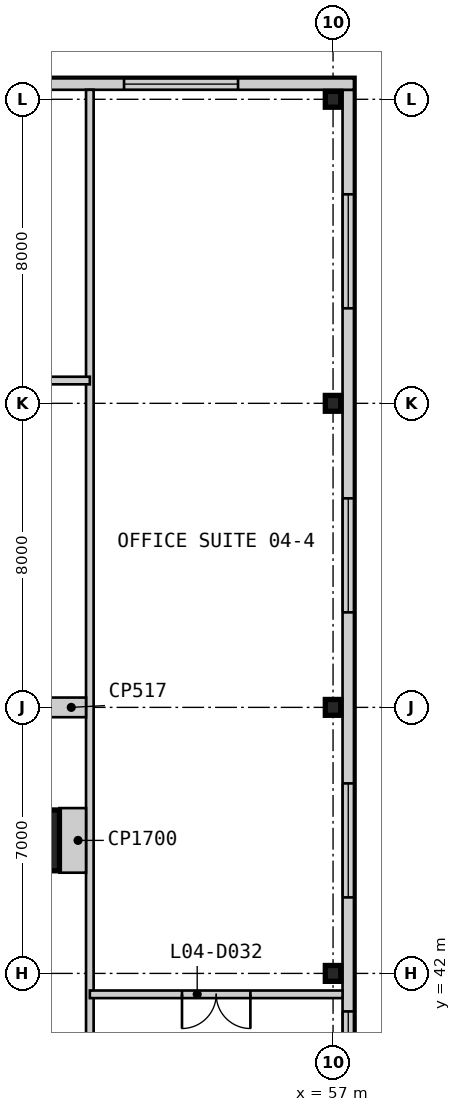
"""IFC4 building model, lengths in metres.
Left out: names, types, materials, properties, quantities, classifications, styles, units other than length and angle.
Written with IfcOpenShell. Run it as: python <this file> out.ifc"""

import sys

from ifc_helpers import new_model, si_unit, direction, frame, frame_2d, origin, origin_2d, place, context, subcontext, project, spatial, rectangle, i_section, extrude, element, fill, save


model = new_model("IFC4")
c1 = context("Model", 3, precision=1e-05, world=origin(), true_north=direction((0.0, 1.0)))
c2 = subcontext(c1, "Body", "Model", "MODEL_VIEW")
j1 = project(units=[si_unit("LENGTHUNIT", "METRE"), si_unit("PLANEANGLEUNIT", "RADIAN")], contexts=[c1])
p1 = place(None, origin())
s1 = spatial("IfcSite", under=j1, at=p1, CompositionType="ELEMENT")
p2 = place(p1, origin())
s2 = spatial("IfcBuilding", under=s1, at=p2, CompositionType="ELEMENT")
p3 = place(p2, frame((0.0, 0.0, 21.4)))
s3 = spatial("IfcBuildingStorey", under=s2, at=p3, CompositionType="ELEMENT", Elevation=21.4)
p4 = place(p3, frame((49.0, 45.5, 0.0), z_axis=(0.0, 0.0, 1.0), x_axis=(1.0, 0.0, 0.0)))
e1 = element("IfcColumn", 1, at=p4, inside=s3, PredefinedType="COLUMN", context=c2, shape_type="SweptSolid", body=[
    extrude(rectangle(XDim=1.6, YDim=1.6, at=origin_2d()), origin(), (0.0, 0.0, 1.0), 4.8),
])
for number, where, z_axis, x_axis in (
    (2, (57.0, 42.0, 0.0), (0.0, 0.0, 1.0), (1.0, 0.0, 0.0)),
    (3, (57.0, 49.0, 0.0), (0.0, 0.0, 1.0), (1.0, 0.0, 0.0)),
    (4, (57.0, 57.0, 0.0), (0.0, 0.0, 1.0), (1.0, 0.0, 0.0)),
    (5, (57.0, 65.0, 0.0), (0.0, 0.0, 1.0), (1.0, 0.0, 0.0)),
):
    element("IfcColumn", number, at=place(p3, frame(where, z_axis=z_axis, x_axis=x_axis)), inside=s3, PredefinedType="COLUMN", context=c2, shape_type="SweptSolid", body=[
        extrude(i_section(OverallWidth=0.406, OverallDepth=0.417, WebThickness=0.03, FlangeThickness=0.048, at=origin_2d()), origin(), (0.0, 0.0, 1.0), 4.8),
    ])
p5 = place(p3, frame((57.4, -7.25, 0.0), z_axis=(0.0, 0.0, 1.0), x_axis=(0.0, 1.0, 0.0)))
e6 = element("IfcWall", 6, at=p5, inside=s3, PredefinedType="SOLIDWALL", context=c2, shape_type="SweptSolid", body=[
    extrude(rectangle(XDim=72.5, YDim=0.3, at=frame_2d((36.25, 0.0))), origin(), (0.0, 0.0, 1.0), 4.5),
])
p6 = place(p5, frame((2.75, 0.0, 0.9)))
e7 = element("IfcOpeningElement", 7, at=p6, cuts=e6, PredefinedType="OPENING", context=c2, shape_type="SweptSolid", body=[
    extrude(rectangle(XDim=3.0, YDim=2.4, at=frame_2d((1.5, 1.2))), frame((0.0, 0.16, 0.0), z_axis=(0.0, -1.0, 0.0), x_axis=(1.0, 0.0, 0.0)), (0.0, 0.0, 1.0), 0.32),
])
p7 = place(p5, frame((10.75, 0.0, 0.9)))
e8 = element("IfcOpeningElement", 8, at=p7, cuts=e6, PredefinedType="OPENING", context=c2, shape_type="SweptSolid", body=[
    extrude(rectangle(XDim=3.0, YDim=2.4, at=frame_2d((1.5, 1.2))), frame((0.0, 0.16, 0.0), z_axis=(0.0, -1.0, 0.0), x_axis=(1.0, 0.0, 0.0)), (0.0, 0.0, 1.0), 0.32),
])
p8 = place(p5, frame((24.75, 0.0, 0.9)))
e9 = element("IfcOpeningElement", 9, at=p8, cuts=e6, PredefinedType="OPENING", context=c2, shape_type="SweptSolid", body=[
    extrude(rectangle(XDim=3.0, YDim=2.4, at=frame_2d((1.5, 1.2))), frame((0.0, 0.16, 0.0), z_axis=(0.0, -1.0, 0.0), x_axis=(1.0, 0.0, 0.0)), (0.0, 0.0, 1.0), 0.32),
])
p9 = place(p5, frame((36.75, 0.0, 0.9)))
e10 = element("IfcOpeningElement", 10, at=p9, cuts=e6, PredefinedType="OPENING", context=c2, shape_type="SweptSolid", body=[
    extrude(rectangle(XDim=3.0, YDim=2.4, at=frame_2d((1.5, 1.2))), frame((0.0, 0.16, 0.0), z_axis=(0.0, -1.0, 0.0), x_axis=(1.0, 0.0, 0.0)), (0.0, 0.0, 1.0), 0.32),
])
p10 = place(p5, frame((45.25, 0.0, 0.9)))
e11 = element("IfcOpeningElement", 11, at=p10, cuts=e6, PredefinedType="OPENING", context=c2, shape_type="SweptSolid", body=[
    extrude(rectangle(XDim=3.0, YDim=2.4, at=frame_2d((1.5, 1.2))), frame((0.0, 0.16, 0.0), z_axis=(0.0, -1.0, 0.0), x_axis=(1.0, 0.0, 0.0)), (0.0, 0.0, 1.0), 0.32),
])
p11 = place(p5, frame((51.25, 0.0, 0.9)))
e12 = element("IfcOpeningElement", 12, at=p11, cuts=e6, PredefinedType="OPENING", context=c2, shape_type="SweptSolid", body=[
    extrude(rectangle(XDim=3.0, YDim=2.4, at=frame_2d((1.5, 1.2))), frame((0.0, 0.16, 0.0), z_axis=(0.0, -1.0, 0.0), x_axis=(1.0, 0.0, 0.0)), (0.0, 0.0, 1.0), 0.32),
])
p12 = place(p5, frame((58.75, 0.0, 0.9)))
e13 = element("IfcOpeningElement", 13, at=p12, cuts=e6, PredefinedType="OPENING", context=c2, shape_type="SweptSolid", body=[
    extrude(rectangle(XDim=3.0, YDim=2.4, at=frame_2d((1.5, 1.2))), frame((0.0, 0.16, 0.0), z_axis=(0.0, -1.0, 0.0), x_axis=(1.0, 0.0, 0.0)), (0.0, 0.0, 1.0), 0.32),
])
p13 = place(p5, frame((66.75, 0.0, 0.9)))
e14 = element("IfcOpeningElement", 14, at=p13, cuts=e6, PredefinedType="OPENING", context=c2, shape_type="SweptSolid", body=[
    extrude(rectangle(XDim=3.0, YDim=2.4, at=frame_2d((1.5, 1.2))), frame((0.0, 0.16, 0.0), z_axis=(0.0, -1.0, 0.0), x_axis=(1.0, 0.0, 0.0)), (0.0, 0.0, 1.0), 0.32),
])
p14 = place(p3, frame((57.55, 65.4, 0.0), z_axis=(0.0, 0.0, 1.0), x_axis=(-1.0, 0.0, 0.0)))
e15 = element("IfcWall", 15, at=p14, inside=s3, PredefinedType="SOLIDWALL", context=c2, shape_type="SweptSolid", body=[
    extrude(rectangle(XDim=65.1, YDim=0.3, at=frame_2d((32.55, 0.0))), origin(), (0.0, 0.0, 1.0), 4.5),
])
p15 = place(p14, frame((59.05, 0.0, 0.9)))
e16 = element("IfcOpeningElement", 16, at=p15, cuts=e15, PredefinedType="OPENING", context=c2, shape_type="SweptSolid", body=[
    extrude(rectangle(XDim=3.0, YDim=2.4, at=frame_2d((1.5, 1.2))), frame((0.0, 0.16, 0.0), z_axis=(0.0, -1.0, 0.0), x_axis=(1.0, 0.0, 0.0)), (0.0, 0.0, 1.0), 0.32),
])
p16 = place(p14, frame((51.05, 0.0, 0.9)))
e17 = element("IfcOpeningElement", 17, at=p16, cuts=e15, PredefinedType="OPENING", context=c2, shape_type="SweptSolid", body=[
    extrude(rectangle(XDim=3.0, YDim=2.4, at=frame_2d((1.5, 1.2))), frame((0.0, 0.16, 0.0), z_axis=(0.0, -1.0, 0.0), x_axis=(1.0, 0.0, 0.0)), (0.0, 0.0, 1.0), 0.32),
])
p17 = place(p14, frame((37.05, 0.0, 0.9)))
e18 = element("IfcOpeningElement", 18, at=p17, cuts=e15, PredefinedType="OPENING", context=c2, shape_type="SweptSolid", body=[
    extrude(rectangle(XDim=3.0, YDim=2.4, at=frame_2d((1.5, 1.2))), frame((0.0, 0.16, 0.0), z_axis=(0.0, -1.0, 0.0), x_axis=(1.0, 0.0, 0.0)), (0.0, 0.0, 1.0), 0.32),
])
p18 = place(p14, frame((25.05, 0.0, 0.9)))
e19 = element("IfcOpeningElement", 19, at=p18, cuts=e15, PredefinedType="OPENING", context=c2, shape_type="SweptSolid", body=[
    extrude(rectangle(XDim=3.0, YDim=2.4, at=frame_2d((1.5, 1.2))), frame((0.0, 0.16, 0.0), z_axis=(0.0, -1.0, 0.0), x_axis=(1.0, 0.0, 0.0)), (0.0, 0.0, 1.0), 0.32),
])
p19 = place(p14, frame((16.55, 0.0, 0.9)))
e20 = element("IfcOpeningElement", 20, at=p19, cuts=e15, PredefinedType="OPENING", context=c2, shape_type="SweptSolid", body=[
    extrude(rectangle(XDim=3.0, YDim=2.4, at=frame_2d((1.5, 1.2))), frame((0.0, 0.16, 0.0), z_axis=(0.0, -1.0, 0.0), x_axis=(1.0, 0.0, 0.0)), (0.0, 0.0, 1.0), 0.32),
])
p20 = place(p14, frame((10.55, 0.0, 0.9)))
e21 = element("IfcOpeningElement", 21, at=p20, cuts=e15, PredefinedType="OPENING", context=c2, shape_type="SweptSolid", body=[
    extrude(rectangle(XDim=3.0, YDim=2.4, at=frame_2d((1.5, 1.2))), frame((0.0, 0.16, 0.0), z_axis=(0.0, -1.0, 0.0), x_axis=(1.0, 0.0, 0.0)), (0.0, 0.0, 1.0), 0.32),
])
p21 = place(p14, frame((3.05, 0.0, 0.9)))
e22 = element("IfcOpeningElement", 22, at=p21, cuts=e15, PredefinedType="OPENING", context=c2, shape_type="SweptSolid", body=[
    extrude(rectangle(XDim=3.0, YDim=2.4, at=frame_2d((1.5, 1.2))), frame((0.0, 0.16, 0.0), z_axis=(0.0, -1.0, 0.0), x_axis=(1.0, 0.0, 0.0)), (0.0, 0.0, 1.0), 0.32),
])
p22 = place(p3, frame((50.6, 39.4, 0.0), z_axis=(0.0, 0.0, 1.0), x_axis=(0.0, 1.0, 0.0)))
e23 = element("IfcWall", 23, at=p22, inside=s3, PredefinedType="PARTITIONING", context=c2, shape_type="SweptSolid", body=[
    extrude(rectangle(XDim=25.85, YDim=0.2, at=frame_2d((12.925, 0.0))), origin(), (0.0, 0.0, 1.0), 4.5),
])
p23 = place(p3, frame((50.6, 41.45, 0.0), z_axis=(0.0, 0.0, 1.0), x_axis=(1.0, 0.0, 0.0)))
e24 = element("IfcWall", 24, at=p23, inside=s3, PredefinedType="PARTITIONING", context=c2, shape_type="SweptSolid", body=[
    extrude(rectangle(XDim=6.65, YDim=0.2, at=frame_2d((3.325, 0.0))), origin(), (0.0, 0.0, 1.0), 4.5),
])
p24 = place(p23, frame((2.425, 0.0, 0.0)))
e25 = element("IfcOpeningElement", 25, at=p24, cuts=e24, PredefinedType="OPENING", context=c2, shape_type="SweptSolid", body=[
    extrude(rectangle(XDim=1.8, YDim=2.4, at=frame_2d((0.9, 1.2))), frame((0.0, 0.11, 0.0), z_axis=(0.0, -1.0, 0.0), x_axis=(1.0, 0.0, 0.0)), (0.0, 0.0, 1.0), 0.22),
])
p25 = place(p3, frame((34.4, 57.6, 0.0), z_axis=(0.0, 0.0, 1.0), x_axis=(1.0, 0.0, 0.0)))
e26 = element("IfcWall", 26, at=p25, inside=s3, PredefinedType="PARTITIONING", context=c2, shape_type="SweptSolid", body=[
    extrude(rectangle(XDim=16.2, YDim=0.2, at=frame_2d((8.1, 0.0))), origin(), (0.0, 0.0, 1.0), 4.5),
])
p26 = place(p3, frame((50.5, 45.5, 0.0), z_axis=(0.0, 0.0, 1.0), x_axis=(-1.0, 0.0, 0.0)))
e27 = element("IfcWall", 27, at=p26, inside=s3, PredefinedType="PARTITIONING", context=c2, shape_type="SweptSolid", body=[
    extrude(rectangle(XDim=0.7, YDim=1.7, at=frame_2d((0.35, 0.0))), origin(), (0.0, 0.0, 1.0), 4.5),
])
p27 = place(p3, frame((50.5, 49.0, 0.0), z_axis=(0.0, 0.0, 1.0), x_axis=(-1.0, 0.0, 0.0)))
e28 = element("IfcWall", 28, at=p27, inside=s3, PredefinedType="PARTITIONING", context=c2, shape_type="SweptSolid", body=[
    extrude(rectangle(XDim=1.297, YDim=0.517, at=frame_2d((0.648, 0.0))), origin(), (0.0, 0.0, 1.0), 3.754),
])
p28 = place(p10, origin())
e29 = element("IfcWindow", 29, at=p28, inside=s3, PartitioningType="SINGLE_PANEL", PredefinedType="WINDOW", context=c2, shape_type="SweptSolid", body=[
    extrude(rectangle(XDim=3.0, YDim=2.4, at=frame_2d((1.5, 1.2))), frame((0.0, 0.03, 0.0), z_axis=(0.0, -1.0, 0.0), x_axis=(1.0, 0.0, 0.0)), (0.0, 0.0, 1.0), 0.06),
])
fill(e11, e29)
p29 = place(p11, origin())
e30 = element("IfcWindow", 30, at=p29, inside=s3, PartitioningType="SINGLE_PANEL", PredefinedType="WINDOW", context=c2, shape_type="SweptSolid", body=[
    extrude(rectangle(XDim=3.0, YDim=2.4, at=frame_2d((1.5, 1.2))), frame((0.0, 0.03, 0.0), z_axis=(0.0, -1.0, 0.0), x_axis=(1.0, 0.0, 0.0)), (0.0, 0.0, 1.0), 0.06),
])
fill(e12, e30)
p30 = place(p12, origin())
e31 = element("IfcWindow", 31, at=p30, inside=s3, PartitioningType="SINGLE_PANEL", PredefinedType="WINDOW", context=c2, shape_type="SweptSolid", body=[
    extrude(rectangle(XDim=3.0, YDim=2.4, at=frame_2d((1.5, 1.2))), frame((0.0, 0.03, 0.0), z_axis=(0.0, -1.0, 0.0), x_axis=(1.0, 0.0, 0.0)), (0.0, 0.0, 1.0), 0.06),
])
fill(e13, e31)
p31 = place(p13, origin())
e32 = element("IfcWindow", 32, at=p31, inside=s3, PartitioningType="SINGLE_PANEL", PredefinedType="WINDOW", context=c2, shape_type="SweptSolid", body=[
    extrude(rectangle(XDim=3.0, YDim=2.4, at=frame_2d((1.5, 1.2))), frame((0.0, 0.03, 0.0), z_axis=(0.0, -1.0, 0.0), x_axis=(1.0, 0.0, 0.0)), (0.0, 0.0, 1.0), 0.06),
])
fill(e14, e32)
p32 = place(p21, origin())
e33 = element("IfcWindow", 33, at=p32, inside=s3, PartitioningType="SINGLE_PANEL", PredefinedType="WINDOW", context=c2, shape_type="SweptSolid", body=[
    extrude(rectangle(XDim=3.0, YDim=2.4, at=frame_2d((1.5, 1.2))), frame((0.0, 0.03, 0.0), z_axis=(0.0, -1.0, 0.0), x_axis=(1.0, 0.0, 0.0)), (0.0, 0.0, 1.0), 0.06),
])
fill(e22, e33)
p33 = place(p24, frame((1.8, 0.0, 0.0), z_axis=(0.0, 0.0, 1.0), x_axis=(-1.0, 0.0, 0.0)))
e34 = element("IfcDoor", 34, at=p33, inside=s3, OperationType="DOUBLE_DOOR_SINGLE_SWING", PredefinedType="DOOR", context=c2, shape_type="SweptSolid", body=[
    extrude(rectangle(XDim=1.8, YDim=2.4, at=frame_2d((0.9, 1.2))), frame((0.0, 0.025, 0.0), z_axis=(0.0, -1.0, 0.0), x_axis=(1.0, 0.0, 0.0)), (0.0, 0.0, 1.0), 0.05),
])
fill(e25, e34)
save(model, sys.argv[1])
